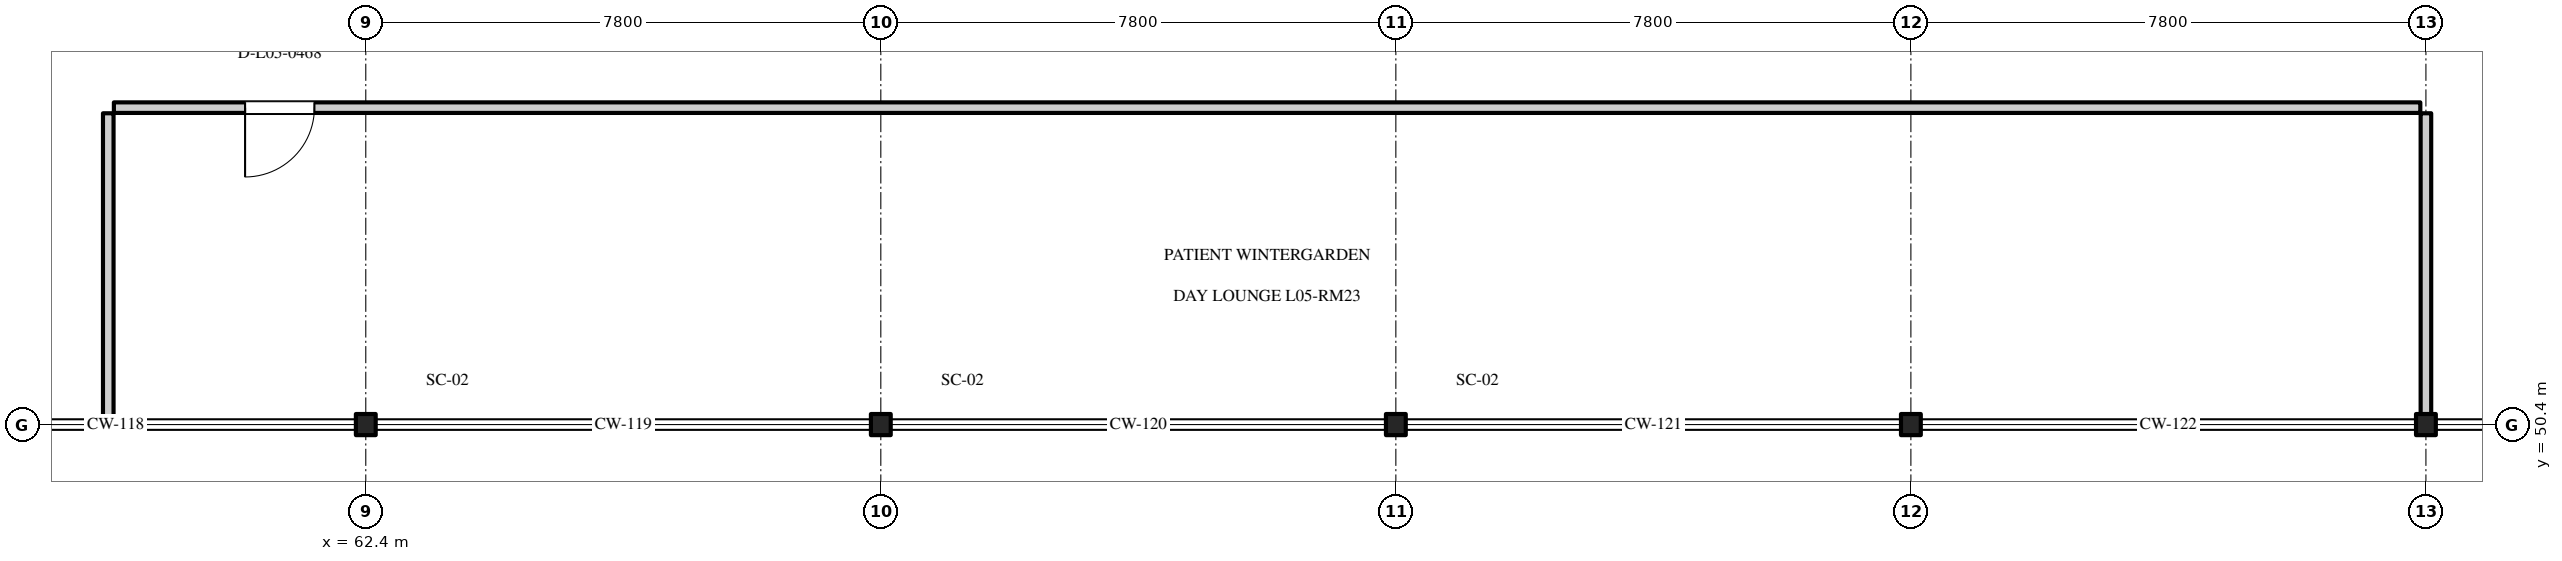
"""IFC4 building model, lengths in metres.
Left out: names, types, materials, properties, quantities, classifications, styles, units other than length and angle.
Written with IfcOpenShell. Run it as: python <this file> out.ifc"""

import sys

from ifc_helpers import new_model, si_unit, direction, frame, frame_2d, origin, origin_2d, place, context, subcontext, project, spatial, rectangle, i_section, extrude, element, fill, save


model = new_model("IFC4")
c1 = context("Model", 3, precision=1e-05, world=origin(), true_north=direction((0.0, 1.0)))
c2 = subcontext(c1, "Body", "Model", "MODEL_VIEW")
j1 = project(units=[si_unit("LENGTHUNIT", "METRE"), si_unit("PLANEANGLEUNIT", "RADIAN")], contexts=[c1])
p1 = place(None, origin())
s1 = spatial("IfcSite", under=j1, at=p1, CompositionType="ELEMENT")
p2 = place(p1, origin())
s2 = spatial("IfcBuilding", under=s1, at=p2, CompositionType="ELEMENT")
p3 = place(p2, frame((0.0, 0.0, 22.2)))
s3 = spatial("IfcBuildingStorey", under=s2, at=p3, CompositionType="ELEMENT", Elevation=22.2)
for number, where, z_axis, x_axis in (
    (1, (62.4, 50.4, 0.0), (0.0, 0.0, 1.0), (1.0, 0.0, 0.0)),
    (2, (70.2, 50.4, 0.0), (0.0, 0.0, 1.0), (1.0, 0.0, 0.0)),
    (3, (78.0, 50.4, 0.0), (0.0, 0.0, 1.0), (1.0, 0.0, 0.0)),
    (4, (85.8, 50.4, 0.0), (0.0, 0.0, 1.0), (1.0, 0.0, 0.0)),
    (5, (93.6, 50.4, 0.0), (0.0, 0.0, 1.0), (1.0, 0.0, 0.0)),
):
    element("IfcColumn", number, at=place(p3, frame(where, z_axis=z_axis, x_axis=x_axis)), inside=s3, PredefinedType="COLUMN", context=c2, shape_type="SweptSolid", body=[
        extrude(i_section(OverallWidth=0.3, OverallDepth=0.32, WebThickness=0.011, FlangeThickness=0.021, FilletRadius=0.027, at=origin_2d()), origin(), (0.0, 0.0, 1.0), 3.9),
    ])
p4 = place(p3, frame((58.585, 55.2, 0.0), z_axis=(0.0, 0.0, 1.0), x_axis=(1.0, 0.0, 0.0)))
e6 = element("IfcWall", 6, at=p4, inside=s3, PredefinedType="PARTITIONING", context=c2, shape_type="SweptSolid", body=[
    extrude(rectangle(XDim=34.93, YDim=0.16, at=frame_2d((17.465, 0.0))), origin(), (0.0, 0.0, 1.0), 3.58),
])
p5 = place(p4, frame((1.987, 0.0, 0.0)))
e7 = element("IfcOpeningElement", 7, at=p5, cuts=e6, PredefinedType="OPENING", context=c2, shape_type="SweptSolid", body=[
    extrude(rectangle(XDim=1.05, YDim=2.1, at=frame_2d((0.525, 1.05))), frame((0.0, 0.092, 0.0), z_axis=(0.0, -1.0, 0.0), x_axis=(1.0, 0.0, 0.0)), (0.0, 0.0, 1.0), 0.184),
])
p6 = place(p3, frame((58.5, 50.485, 0.0), z_axis=(0.0, 0.0, 1.0), x_axis=(0.0, 1.0, 0.0)))
e8 = element("IfcWall", 8, at=p6, inside=s3, PredefinedType="PARTITIONING", context=c2, shape_type="SweptSolid", body=[
    extrude(rectangle(XDim=4.63, YDim=0.16, at=frame_2d((2.315, 0.0))), origin(), (0.0, 0.0, 1.0), 3.58),
])
p7 = place(p3, frame((93.6, 50.485, 0.0), z_axis=(0.0, 0.0, 1.0), x_axis=(0.0, 1.0, 0.0)))
e9 = element("IfcWall", 9, at=p7, inside=s3, PredefinedType="PARTITIONING", context=c2, shape_type="SweptSolid", body=[
    extrude(rectangle(XDim=4.63, YDim=0.16, at=frame_2d((2.315, 0.0))), origin(), (0.0, 0.0, 1.0), 3.2),
])
p8 = place(p5, frame((1.05, 0.0, 0.0), z_axis=(0.0, 0.0, 1.0), x_axis=(-1.0, 0.0, 0.0)))
e10 = element("IfcDoor", 10, at=p8, inside=s3, OperationType="SINGLE_SWING_RIGHT", PredefinedType="DOOR", context=c2, shape_type="SweptSolid", body=[
    extrude(rectangle(XDim=1.05, YDim=2.1, at=frame_2d((0.525, 1.05))), frame((0.0, 0.025, 0.0), z_axis=(0.0, -1.0, 0.0), x_axis=(1.0, 0.0, 0.0)), (0.0, 0.0, 1.0), 0.05),
])
fill(e7, e10)
save(model, sys.argv[1])
